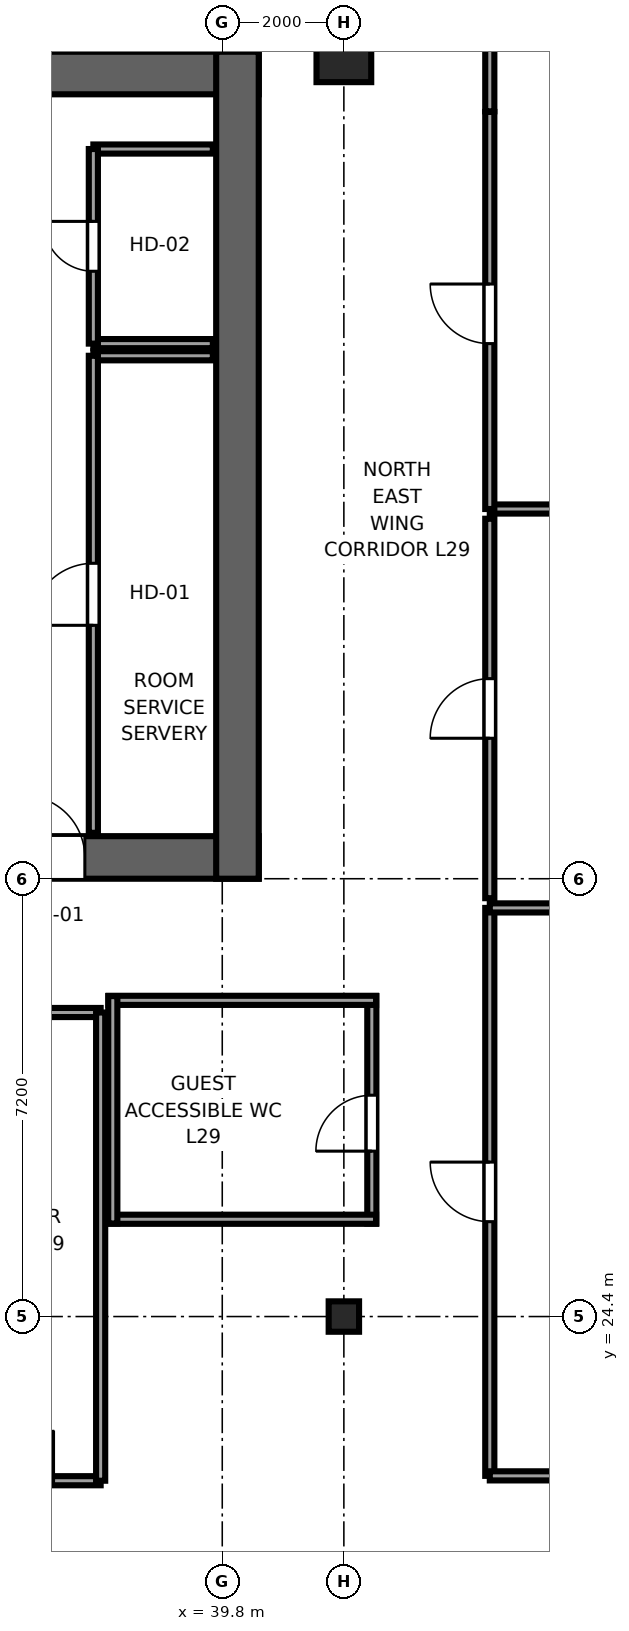
"""IFC4 building model, lengths in metres.
Left out: names, types, materials, properties, quantities, classifications, styles, units other than length and angle.
Written with IfcOpenShell. Run it as: python <this file> out.ifc"""

import sys

from ifc_helpers import new_model, si_unit, direction, frame, frame_2d, origin, origin_2d, place, context, subcontext, project, spatial, rectangle, i_section, extrude, source, transform, mapped, element, fill, save


model = new_model("IFC4")
c1 = context("Model", 3, precision=1e-05, world=origin(), true_north=direction((0.0, 1.0)))
c2 = subcontext(c1, "Body", "Model", "MODEL_VIEW")
j1 = project(units=[si_unit("LENGTHUNIT", "METRE"), si_unit("PLANEANGLEUNIT", "RADIAN")], contexts=[c1])
p1 = place(None, origin())
s1 = spatial("IfcSite", under=j1, at=p1, CompositionType="ELEMENT")
p2 = place(p1, origin())
s2 = spatial("IfcBuilding", under=s1, at=p2, CompositionType="ELEMENT")
p3 = place(p2, frame((0.0, 0.0, 115.1)))
s3 = spatial("IfcBuildingStorey", under=s2, at=p3, CompositionType="ELEMENT", Elevation=115.1)
p4 = place(p3, frame((36.2, 31.95, 0.0), z_axis=(0.0, 0.0, 1.0), x_axis=(1.0, 0.0, 0.0)))
e1 = element("IfcWall", 1, at=p4, inside=s3, PredefinedType="SHEAR", context=c2, shape_type="SweptSolid", body=[
    extrude(rectangle(XDim=4.2, YDim=0.7, at=frame_2d((2.1, 0.0))), origin(), (0.0, 0.0, 1.0), 3.55),
])
p5 = place(p4, frame((1.34, 0.0, 0.0), z_axis=(0.0, 0.0, 1.0), x_axis=(-1.0, 0.0, 0.0)))
e2 = element("IfcOpeningElement", 2, at=p5, cuts=e1, PredefinedType="OPENING", context=c2, shape_type="SweptSolid", body=[
    extrude(rectangle(XDim=1.02, YDim=2.03, at=frame_2d((0.51, 1.015))), frame((0.0, 0.36, 0.0), z_axis=(0.0, -1.0, 0.0), x_axis=(1.0, 0.0, 0.0)), (0.0, 0.0, 1.0), 0.72),
])
p6 = place(p3, frame((36.2, 44.85, 0.0), z_axis=(0.0, 0.0, 1.0), x_axis=(1.0, 0.0, 0.0)))
e3 = element("IfcWall", 3, at=p6, inside=s3, PredefinedType="SHEAR", context=c2, shape_type="SweptSolid", body=[
    extrude(rectangle(XDim=4.2, YDim=0.7, at=frame_2d((2.1, 0.0))), origin(), (0.0, 0.0, 1.0), 3.55),
])
p7 = place(p3, frame((40.05, 31.6, 0.0), z_axis=(0.0, 0.0, 1.0), x_axis=(0.0, 1.0, 0.0)))
e4 = element("IfcWall", 4, at=p7, inside=s3, PredefinedType="SHEAR", context=c2, shape_type="SweptSolid", body=[
    extrude(rectangle(XDim=13.6, YDim=0.7, at=frame_2d((6.8, 0.0))), origin(), (0.0, 0.0, 1.0), 3.55),
])
m1 = source(origin(), c2, "Body", "SweptSolid", [
    extrude(i_section(OverallWidth=0.5, OverallDepth=0.5, WebThickness=0.022, FlangeThickness=0.034, at=origin_2d()), origin(), (0.0, 0.0, 1.0), 3.55),
])
p8 = place(p3, frame((41.8, 24.4, 0.0), z_axis=(0.0, 0.0, 1.0), x_axis=(1.0, 0.0, 0.0)))
e5 = element("IfcColumn", 5, at=p8, inside=s3, PredefinedType="COLUMN", context=c2, shape_type="MappedRepresentation", body=[
    mapped(m1, transform((0.0, 0.0, 0.0), x_axis=(1.0, 0.0, 0.0), y_axis=(0.0, 1.0, 0.0), z_axis=(0.0, 0.0, 1.0), scale=1.0)),
])
m2 = source(origin(), c2, "Body", "SweptSolid", [
    extrude(rectangle(XDim=0.9, YDim=0.9, at=origin_2d()), origin(), (0.0, 0.0, 1.0), 3.55),
])
p9 = place(p3, frame((41.8, 45.15, 0.0), z_axis=(0.0, 0.0, 1.0), x_axis=(1.0, 0.0, 0.0)))
e6 = element("IfcColumn", 6, at=p9, inside=s3, PredefinedType="COLUMN", context=c2, shape_type="MappedRepresentation", body=[
    mapped(m2, transform((0.0, 0.0, 0.0), x_axis=(1.0, 0.0, 0.0), y_axis=(0.0, 1.0, 0.0), z_axis=(0.0, 0.0, 1.0), scale=1.0)),
])
p10 = place(p3, frame((44.2, 37.68, 0.0), z_axis=(0.0, 0.0, 1.0), x_axis=(1.0, 0.0, 0.0)))
e7 = element("IfcWall", 7, at=p10, inside=s3, PredefinedType="PARTITIONING", context=c2, shape_type="SweptSolid", body=[
    extrude(rectangle(XDim=12.395, YDim=0.15, at=frame_2d((6.198, 0.0))), origin(), (0.0, 0.0, 1.0), 3.37),
])
p11 = place(p3, frame((37.68, 40.2, 0.0), z_axis=(0.0, 0.0, 1.0), x_axis=(1.0, 0.0, 0.0)))
e8 = element("IfcWall", 8, at=p11, inside=s3, PredefinedType="PARTITIONING", context=c2, shape_type="SweptSolid", body=[
    extrude(rectangle(XDim=1.965, YDim=0.15, at=frame_2d((0.982, 0.0))), origin(), (0.0, 0.0, 1.0), 3.37),
])
p12 = place(p3, frame((37.68, 32.355, 0.0), z_axis=(0.0, 0.0, 1.0), x_axis=(0.0, 1.0, 0.0)))
e9 = element("IfcWall", 9, at=p12, inside=s3, PredefinedType="PARTITIONING", context=c2, shape_type="SweptSolid", body=[
    extrude(rectangle(XDim=7.845, YDim=0.15, at=frame_2d((3.922, 0.0))), origin(), (0.0, 0.0, 1.0), 3.37),
])
p13 = place(p12, frame((3.413, 0.0, 0.0)))
e10 = element("IfcOpeningElement", 10, at=p13, cuts=e9, PredefinedType="OPENING", context=c2, shape_type="SweptSolid", body=[
    extrude(rectangle(XDim=1.02, YDim=2.03, at=frame_2d((0.51, 1.015))), frame((0.0, 0.085, 0.0), z_axis=(0.0, -1.0, 0.0), x_axis=(1.0, 0.0, 0.0)), (0.0, 0.0, 1.0), 0.17),
])
for number, where, z_axis, x_axis in (
    (11, (37.68, 40.4, 0.0), (0.0, 0.0, 1.0), (1.0, 0.0, 0.0)),
    (12, (37.68, 43.6, 0.0), (0.0, 0.0, 1.0), (1.0, 0.0, 0.0)),
):
    element("IfcWall", number, at=place(p3, frame(where, z_axis=z_axis, x_axis=x_axis)), inside=s3, PredefinedType="PARTITIONING", context=c2, shape_type="SweptSolid", body=[
        extrude(rectangle(XDim=1.965, YDim=0.15, at=frame_2d((0.982, 0.0))), origin(), (0.0, 0.0, 1.0), 3.37),
    ])
p14 = place(p3, frame((37.68, 40.4, 0.0), z_axis=(0.0, 0.0, 1.0), x_axis=(0.0, 1.0, 0.0)))
e13 = element("IfcWall", 13, at=p14, inside=s3, PredefinedType="PARTITIONING", context=c2, shape_type="SweptSolid", body=[
    extrude(rectangle(XDim=3.2, YDim=0.15, at=frame_2d((1.6, 0.0))), origin(), (0.0, 0.0, 1.0), 3.37),
])
p15 = place(p14, frame((1.19, 0.0, 0.0)))
e14 = element("IfcOpeningElement", 14, at=p15, cuts=e13, PredefinedType="OPENING", context=c2, shape_type="SweptSolid", body=[
    extrude(rectangle(XDim=0.82, YDim=2.01, at=frame_2d((0.41, 1.005))), frame((0.0, 0.085, 0.0), z_axis=(0.0, -1.0, 0.0), x_axis=(1.0, 0.0, 0.0)), (0.0, 0.0, 1.0), 0.17),
])
p16 = place(p3, frame((44.2, 21.78, 0.0), z_axis=(0.0, 0.0, 1.0), x_axis=(0.0, 1.0, 0.0)))
e15 = element("IfcWall", 15, at=p16, inside=s3, PredefinedType="PARTITIONING", context=c2, shape_type="SweptSolid", body=[
    extrude(rectangle(XDim=9.34, YDim=0.15, at=frame_2d((4.67, 0.0))), origin(), (0.0, 0.0, 1.0), 3.37),
])
p17 = place(p16, frame((4.18, 0.0, 0.0)))
e16 = element("IfcOpeningElement", 16, at=p17, cuts=e15, PredefinedType="OPENING", context=c2, shape_type="SweptSolid", body=[
    extrude(rectangle(XDim=0.98, YDim=2.12, at=frame_2d((0.49, 1.06))), frame((0.0, 0.085, 0.0), z_axis=(0.0, -1.0, 0.0), x_axis=(1.0, 0.0, 0.0)), (0.0, 0.0, 1.0), 0.17),
])
p18 = place(p3, frame((44.2, 21.78, 0.0), z_axis=(0.0, 0.0, 1.0), x_axis=(1.0, 0.0, 0.0)))
e17 = element("IfcWall", 17, at=p18, inside=s3, PredefinedType="PARTITIONING", context=c2, shape_type="SweptSolid", body=[
    extrude(rectangle(XDim=12.395, YDim=0.15, at=frame_2d((6.198, 0.0))), origin(), (0.0, 0.0, 1.0), 3.37),
])
p19 = place(p3, frame((44.2, 31.12, 0.0), z_axis=(0.0, 0.0, 1.0), x_axis=(1.0, 0.0, 0.0)))
e18 = element("IfcWall", 18, at=p19, inside=s3, PredefinedType="PARTITIONING", context=c2, shape_type="SweptSolid", body=[
    extrude(rectangle(XDim=10.03, YDim=0.15, at=frame_2d((5.015, 0.0))), origin(), (0.0, 0.0, 1.0), 3.37),
])
p20 = place(p3, frame((44.2, 31.28, 0.0), z_axis=(0.0, 0.0, 1.0), x_axis=(0.0, 1.0, 0.0)))
e19 = element("IfcWall", 19, at=p20, inside=s3, PredefinedType="PARTITIONING", context=c2, shape_type="SweptSolid", body=[
    extrude(rectangle(XDim=6.24, YDim=0.15, at=frame_2d((3.12, 0.0))), origin(), (0.0, 0.0, 1.0), 3.37),
])
p21 = place(p20, frame((2.63, 0.0, 0.0)))
e20 = element("IfcOpeningElement", 20, at=p21, cuts=e19, PredefinedType="OPENING", context=c2, shape_type="SweptSolid", body=[
    extrude(rectangle(XDim=0.98, YDim=2.12, at=frame_2d((0.49, 1.06))), frame((0.0, 0.085, 0.0), z_axis=(0.0, -1.0, 0.0), x_axis=(1.0, 0.0, 0.0)), (0.0, 0.0, 1.0), 0.17),
])
p22 = place(p3, frame((44.2, 37.68, 0.0), z_axis=(0.0, 0.0, 1.0), x_axis=(0.0, 1.0, 0.0)))
e21 = element("IfcWall", 21, at=p22, inside=s3, PredefinedType="PARTITIONING", context=c2, shape_type="SweptSolid", body=[
    extrude(rectangle(XDim=6.53, YDim=0.15, at=frame_2d((3.265, 0.0))), origin(), (0.0, 0.0, 1.0), 3.37),
])
p23 = place(p22, frame((2.72, 0.0, 0.0)))
e22 = element("IfcOpeningElement", 22, at=p23, cuts=e21, PredefinedType="OPENING", context=c2, shape_type="SweptSolid", body=[
    extrude(rectangle(XDim=0.98, YDim=2.12, at=frame_2d((0.49, 1.06))), frame((0.0, 0.085, 0.0), z_axis=(0.0, -1.0, 0.0), x_axis=(1.0, 0.0, 0.0)), (0.0, 0.0, 1.0), 0.17),
])
p24 = place(p3, frame((44.2, 44.22, 0.0), z_axis=(0.0, 0.0, 1.0), x_axis=(0.0, 1.0, 0.0)))
e23 = element("IfcWall", 23, at=p24, inside=s3, PredefinedType="PARTITIONING", context=c2, shape_type="SweptSolid", body=[
    extrude(rectangle(XDim=1.375, YDim=0.15, at=frame_2d((0.688, 0.0))), origin(), (0.0, 0.0, 1.0), 3.37),
])
p25 = place(p3, frame((42.26, 25.93, 0.0), z_axis=(0.0, 0.0, 1.0), x_axis=(0.0, 1.0, 0.0)))
e24 = element("IfcWall", 24, at=p25, inside=s3, PredefinedType="PARTITIONING", context=c2, shape_type="SweptSolid", body=[
    extrude(rectangle(XDim=3.74, YDim=0.15, at=frame_2d((1.87, 0.0))), origin(), (0.0, 0.0, 1.0), 3.37),
])
p26 = place(p25, frame((1.19, 0.0, 0.0)))
e25 = element("IfcOpeningElement", 25, at=p26, cuts=e24, PredefinedType="OPENING", context=c2, shape_type="SweptSolid", body=[
    extrude(rectangle(XDim=0.92, YDim=2.01, at=frame_2d((0.46, 1.005))), frame((0.0, 0.085, 0.0), z_axis=(0.0, -1.0, 0.0), x_axis=(1.0, 0.0, 0.0)), (0.0, 0.0, 1.0), 0.17),
])
for number, where, z_axis, x_axis in (
    (26, (37.93, 26.0, 0.0), (0.0, 0.0, 1.0), (1.0, 0.0, 0.0)),
    (27, (37.93, 29.6, 0.0), (0.0, 0.0, 1.0), (1.0, 0.0, 0.0)),
):
    element("IfcWall", number, at=place(p3, frame(where, z_axis=z_axis, x_axis=x_axis)), inside=s3, PredefinedType="PARTITIONING", context=c2, shape_type="SweptSolid", body=[
        extrude(rectangle(XDim=4.4, YDim=0.15, at=frame_2d((2.2, 0.0))), origin(), (0.0, 0.0, 1.0), 3.37),
    ])
p27 = place(p3, frame((38.0, 25.93, 0.0), z_axis=(0.0, 0.0, 1.0), x_axis=(0.0, 1.0, 0.0)))
e28 = element("IfcWall", 28, at=p27, inside=s3, PredefinedType="PARTITIONING", context=c2, shape_type="SweptSolid", body=[
    extrude(rectangle(XDim=3.74, YDim=0.15, at=frame_2d((1.87, 0.0))), origin(), (0.0, 0.0, 1.0), 3.37),
])
p28 = place(p3, frame((34.6, 21.7, 0.0), z_axis=(0.0, 0.0, 1.0), x_axis=(1.0, 0.0, 0.0)))
e29 = element("IfcWall", 29, at=p28, inside=s3, PredefinedType="PARTITIONING", context=c2, shape_type="SweptSolid", body=[
    extrude(rectangle(XDim=3.2, YDim=0.15, at=frame_2d((1.6, 0.0))), origin(), (0.0, 0.0, 1.0), 3.37),
])
p29 = place(p28, frame((0.775, 0.0, 0.0)))
e30 = element("IfcOpeningElement", 30, at=p29, cuts=e29, PredefinedType="OPENING", context=c2, shape_type="SweptSolid", body=[
    extrude(rectangle(XDim=1.65, YDim=2.15, at=frame_2d((0.825, 1.075))), frame((0.0, 0.085, 0.0), z_axis=(0.0, -1.0, 0.0), x_axis=(1.0, 0.0, 0.0)), (0.0, 0.0, 1.0), 0.17),
])
p30 = place(p3, frame((34.6, 29.4, 0.0), z_axis=(0.0, 0.0, 1.0), x_axis=(1.0, 0.0, 0.0)))
e31 = element("IfcWall", 31, at=p30, inside=s3, PredefinedType="PARTITIONING", context=c2, shape_type="SweptSolid", body=[
    extrude(rectangle(XDim=3.2, YDim=0.15, at=frame_2d((1.6, 0.0))), origin(), (0.0, 0.0, 1.0), 3.37),
])
p31 = place(p3, frame((37.8, 21.7, 0.0), z_axis=(0.0, 0.0, 1.0), x_axis=(0.0, 1.0, 0.0)))
e32 = element("IfcWall", 32, at=p31, inside=s3, PredefinedType="PARTITIONING", context=c2, shape_type="SweptSolid", body=[
    extrude(rectangle(XDim=7.7, YDim=0.15, at=frame_2d((3.85, 0.0))), origin(), (0.0, 0.0, 1.0), 3.37),
])
m3 = source(origin(), c2, "Body", "SweptSolid", [
    extrude(rectangle(XDim=1.02, YDim=2.03, at=frame_2d((0.51, 1.015))), frame((0.0, 0.025, 0.0), z_axis=(0.0, -1.0, 0.0), x_axis=(1.0, 0.0, 0.0)), (0.0, 0.0, 1.0), 0.05),
])
p32 = place(p5, origin())
e33 = element("IfcDoor", 33, at=p32, inside=s3, OperationType="SINGLE_SWING_LEFT", PredefinedType="DOOR", context=c2, shape_type="MappedRepresentation", body=[
    mapped(m3, transform((0.0, 0.0, 0.0), x_axis=(1.0, 0.0, 0.0), y_axis=(0.0, 1.0, 0.0), z_axis=(0.0, 0.0, 1.0), scale=1.0)),
])
fill(e2, e33)
p33 = place(p13, origin())
e34 = element("IfcDoor", 34, at=p33, inside=s3, OperationType="SINGLE_SWING_LEFT", PredefinedType="DOOR", context=c2, shape_type="MappedRepresentation", body=[
    mapped(m3, transform((0.0, 0.0, 0.0), x_axis=(1.0, 0.0, 0.0), y_axis=(0.0, 1.0, 0.0), z_axis=(0.0, 0.0, 1.0), scale=1.0)),
])
fill(e10, e34)
m4 = source(origin(), c2, "Body", "SweptSolid", [
    extrude(rectangle(XDim=0.82, YDim=2.01, at=frame_2d((0.41, 1.005))), frame((0.0, 0.025, 0.0), z_axis=(0.0, -1.0, 0.0), x_axis=(1.0, 0.0, 0.0)), (0.0, 0.0, 1.0), 0.05),
])
p34 = place(p15, origin())
e35 = element("IfcDoor", 35, at=p34, inside=s3, OperationType="SINGLE_SWING_RIGHT", PredefinedType="DOOR", context=c2, shape_type="MappedRepresentation", body=[
    mapped(m4, transform((0.0, 0.0, 0.0), x_axis=(1.0, 0.0, 0.0), y_axis=(0.0, 1.0, 0.0), z_axis=(0.0, 0.0, 1.0), scale=1.0)),
])
fill(e14, e35)
m5 = source(origin(), c2, "Body", "SweptSolid", [
    extrude(rectangle(XDim=0.98, YDim=2.12, at=frame_2d((0.49, 1.06))), frame((0.0, 0.025, 0.0), z_axis=(0.0, -1.0, 0.0), x_axis=(1.0, 0.0, 0.0)), (0.0, 0.0, 1.0), 0.05),
])
p35 = place(p17, origin())
e36 = element("IfcDoor", 36, at=p35, inside=s3, OperationType="SINGLE_SWING_RIGHT", PredefinedType="DOOR", context=c2, shape_type="MappedRepresentation", body=[
    mapped(m5, transform((0.0, 0.0, 0.0), x_axis=(1.0, 0.0, 0.0), y_axis=(0.0, 1.0, 0.0), z_axis=(0.0, 0.0, 1.0), scale=1.0)),
])
fill(e16, e36)
p36 = place(p21, origin())
e37 = element("IfcDoor", 37, at=p36, inside=s3, OperationType="SINGLE_SWING_LEFT", PredefinedType="DOOR", context=c2, shape_type="MappedRepresentation", body=[
    mapped(m5, transform((0.0, 0.0, 0.0), x_axis=(1.0, 0.0, 0.0), y_axis=(0.0, 1.0, 0.0), z_axis=(0.0, 0.0, 1.0), scale=1.0)),
])
fill(e20, e37)
p37 = place(p23, origin())
e38 = element("IfcDoor", 38, at=p37, inside=s3, OperationType="SINGLE_SWING_RIGHT", PredefinedType="DOOR", context=c2, shape_type="MappedRepresentation", body=[
    mapped(m5, transform((0.0, 0.0, 0.0), x_axis=(1.0, 0.0, 0.0), y_axis=(0.0, 1.0, 0.0), z_axis=(0.0, 0.0, 1.0), scale=1.0)),
])
fill(e22, e38)
m6 = source(origin(), c2, "Body", "SweptSolid", [
    extrude(rectangle(XDim=0.92, YDim=2.01, at=frame_2d((0.46, 1.005))), frame((0.0, 0.025, 0.0), z_axis=(0.0, -1.0, 0.0), x_axis=(1.0, 0.0, 0.0)), (0.0, 0.0, 1.0), 0.05),
])
p38 = place(p26, origin())
e39 = element("IfcDoor", 39, at=p38, inside=s3, OperationType="SINGLE_SWING_LEFT", PredefinedType="DOOR", context=c2, shape_type="MappedRepresentation", body=[
    mapped(m6, transform((0.0, 0.0, 0.0), x_axis=(1.0, 0.0, 0.0), y_axis=(0.0, 1.0, 0.0), z_axis=(0.0, 0.0, 1.0), scale=1.0)),
])
fill(e25, e39)
m7 = source(origin(), c2, "Body", "SweptSolid", [
    extrude(rectangle(XDim=1.65, YDim=2.15, at=frame_2d((0.825, 1.075))), frame((0.0, 0.025, 0.0), z_axis=(0.0, -1.0, 0.0), x_axis=(1.0, 0.0, 0.0)), (0.0, 0.0, 1.0), 0.05),
])
p39 = place(p29, origin())
e40 = element("IfcDoor", 40, at=p39, inside=s3, OperationType="DOUBLE_DOOR_SINGLE_SWING", PredefinedType="DOOR", context=c2, shape_type="MappedRepresentation", body=[
    mapped(m7, transform((0.0, 0.0, 0.0), x_axis=(1.0, 0.0, 0.0), y_axis=(0.0, 1.0, 0.0), z_axis=(0.0, 0.0, 1.0), scale=1.0)),
])
fill(e30, e40)
save(model, sys.argv[1])
